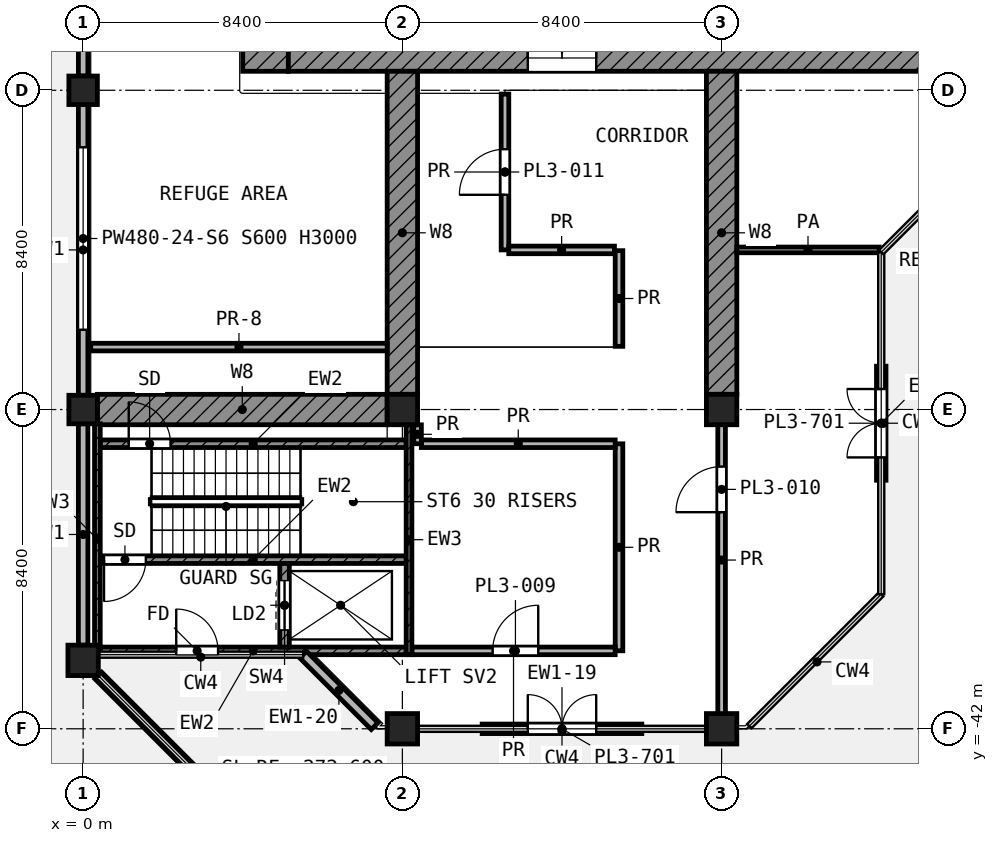
"""IFC4 building model, lengths in metres.
Left out: names, types, materials, properties, quantities, classifications, styles, units other than length and angle.
Written with IfcOpenShell. Run it as: python <this file> out.ifc"""

import sys

from ifc_helpers import new_model, si_unit, direction, frame, frame_2d, origin, origin_2d, place, context, subcontext, project, spatial, rectangle, extrude, element, fill, save


model = new_model("IFC4")
c1 = context("Model", 3, precision=1e-05, world=origin(), true_north=direction((0.0, 1.0)))
c2 = subcontext(c1, "Body", "Model", "MODEL_VIEW")
j1 = project(units=[si_unit("LENGTHUNIT", "METRE"), si_unit("PLANEANGLEUNIT", "RADIAN")], contexts=[c1])
p1 = place(None, origin())
s1 = spatial("IfcSite", under=j1, at=p1, CompositionType="ELEMENT")
p2 = place(p1, origin())
s2 = spatial("IfcBuilding", under=s1, at=p2, CompositionType="ELEMENT")
p3 = place(p2, frame((0.0, 0.0, 272.6)))
s3 = spatial("IfcBuildingStorey", under=s2, at=p3, CompositionType="ELEMENT", Elevation=272.6)
for number, where, z_axis, x_axis in (
    (1, (0.0, -25.2, 0.0), (0.0, 0.0, 1.0), (1.0, 0.0, 0.0)),
    (2, (0.0, -33.6, 0.0), (0.0, 0.0, 1.0), (1.0, 0.0, 0.0)),
):
    element("IfcColumn", number, at=place(p3, frame(where, z_axis=z_axis, x_axis=x_axis)), inside=s3, PredefinedType="COLUMN", context=c2, shape_type="SweptSolid", body=[
        extrude(rectangle(XDim=0.75, YDim=0.75, at=origin_2d()), origin(), (0.0, 0.0, 1.0), 5.0),
    ])
for number, where, z_axis, x_axis in (
    (3, (8.4, -33.6, 0.0), (0.0, 0.0, 1.0), (1.0, 0.0, 0.0)),
    (4, (16.8, -33.6, 0.0), (0.0, 0.0, 1.0), (1.0, 0.0, 0.0)),
    (5, (0.0, -40.2, 0.0), (0.0, 0.0, 1.0), (1.0, 0.0, 0.0)),
    (6, (8.4, -42.0, 0.0), (0.0, 0.0, 1.0), (1.0, 0.0, 0.0)),
    (7, (16.8, -42.0, 0.0), (0.0, 0.0, 1.0), (1.0, 0.0, 0.0)),
):
    element("IfcColumn", number, at=place(p3, frame(where, z_axis=z_axis, x_axis=x_axis)), inside=s3, PredefinedType="COLUMN", context=c2, shape_type="SweptSolid", body=[
        extrude(rectangle(XDim=0.8, YDim=0.8, at=origin_2d()), origin(), (0.0, 0.0, 1.0), 5.0),
    ])
for number, where, z_axis, x_axis in (
    (8, (8.4, -24.7, 0.0), (0.0, 0.0, 1.0), (0.0, -1.0, 0.0)),
    (9, (16.8, -24.7, 0.0), (0.0, 0.0, 1.0), (0.0, -1.0, 0.0)),
):
    element("IfcWall", number, at=place(p3, frame(where, z_axis=z_axis, x_axis=x_axis)), inside=s3, PredefinedType="SHEAR", context=c2, shape_type="SweptSolid", body=[
        extrude(rectangle(XDim=8.5, YDim=0.8, at=frame_2d((4.25, 0.0))), origin(), (0.0, 0.0, 1.0), 4.4),
    ])
p4 = place(p3, frame((0.375, -33.6, 0.0), z_axis=(0.0, 0.0, 1.0), x_axis=(1.0, 0.0, 0.0)))
e10 = element("IfcWall", 10, at=p4, inside=s3, PredefinedType="SHEAR", context=c2, shape_type="SweptSolid", body=[
    extrude(rectangle(XDim=7.625, YDim=0.8, at=frame_2d((3.812, 0.0))), origin(), (0.0, 0.0, 1.0), 4.4),
])
p5 = place(p3, frame((0.0, -17.175, 0.0), z_axis=(0.0, 0.0, 1.0), x_axis=(0.0, -1.0, 0.0)))
e11 = element("IfcWall", 11, at=p5, inside=s3, PredefinedType="SOLIDWALL", context=c2, shape_type="SweptSolid", body=[
    extrude(rectangle(XDim=7.65, YDim=0.25, at=frame_2d((3.825, 0.0))), origin(), (0.0, 0.0, 1.0), 3.3),
])
p6 = place(p3, frame((0.0, -25.575, 0.0), z_axis=(0.0, 0.0, 1.0), x_axis=(0.0, -1.0, 0.0)))
e12 = element("IfcWall", 12, at=p6, inside=s3, PredefinedType="SOLIDWALL", context=c2, shape_type="SweptSolid", body=[
    extrude(rectangle(XDim=7.65, YDim=0.25, at=frame_2d((3.825, 0.0))), origin(), (0.0, 0.0, 1.0), 3.3),
])
p7 = place(p6, frame((1.125, 0.0, 0.6)))
e13 = element("IfcOpeningElement", 13, at=p7, cuts=e12, PredefinedType="OPENING", context=c2, shape_type="SweptSolid", body=[
    extrude(rectangle(XDim=4.8, YDim=2.4, at=frame_2d((2.4, 1.2))), frame((0.0, 0.135, 0.0), z_axis=(0.0, -1.0, 0.0), x_axis=(1.0, 0.0, 0.0)), (0.0, 0.0, 1.0), 0.27),
])
p8 = place(p3, frame((0.0, -33.975, 0.0), z_axis=(0.0, 0.0, 1.0), x_axis=(0.0, -1.0, 0.0)))
e14 = element("IfcWall", 14, at=p8, inside=s3, PredefinedType="SOLIDWALL", context=c2, shape_type="SweptSolid", body=[
    extrude(rectangle(XDim=5.825, YDim=0.25, at=frame_2d((2.913, 0.0))), origin(), (0.0, 0.0, 1.0), 3.3),
])
p9 = place(p3, frame((0.4, -40.6, 0.0), z_axis=(0.0, 0.0, 1.0), x_axis=(0.707123380132, -0.707090181851, 0.0)))
e15 = element("IfcWall", 15, at=p9, inside=s3, PredefinedType="SOLIDWALL", context=c2, shape_type="SweptSolid", body=[
    extrude(rectangle(XDim=7.354, YDim=0.25, at=frame_2d((3.677, 0.0))), origin(), (0.0, 0.0, 1.0), 3.3),
])
p10 = place(p3, frame((5.79, -40.05, 0.0), z_axis=(0.0, 0.0, 1.0), x_axis=(0.707106781187, -0.707106781187, 0.0)))
e16 = element("IfcWall", 16, at=p10, inside=s3, PredefinedType="SOLIDWALL", context=c2, shape_type="SweptSolid", body=[
    extrude(rectangle(XDim=2.658, YDim=0.25, at=frame_2d((1.329, 0.0))), origin(), (0.0, 0.0, 1.0), 4.4),
])
p11 = place(p3, frame((10.5, -42.001, 0.0), z_axis=(0.0, 0.0, 1.0), x_axis=(1.0, 0.0, 0.0)))
e17 = element("IfcWall", 17, at=p11, inside=s3, PredefinedType="SOLIDWALL", context=c2, shape_type="SweptSolid", body=[
    extrude(rectangle(XDim=4.2, YDim=0.25, at=frame_2d((2.1, 0.0))), origin(), (0.0, 0.0, 1.0), 4.24),
])
p12 = place(p11, frame((1.2, 0.0, 0.0)))
e18 = element("IfcOpeningElement", 18, at=p12, cuts=e17, PredefinedType="OPENING", context=c2, shape_type="SweptSolid", body=[
    extrude(rectangle(XDim=1.8, YDim=2.1, at=frame_2d((0.9, 1.05))), frame((0.0, 0.135, 0.0), z_axis=(0.0, -1.0, 0.0), x_axis=(1.0, 0.0, 0.0)), (0.0, 0.0, 1.0), 0.27),
])
p13 = place(p3, frame((21.0, -35.46, 0.0), z_axis=(0.0, 0.0, 1.0), x_axis=(0.0, 1.0, 0.0)))
e19 = element("IfcWall", 19, at=p13, inside=s3, PredefinedType="SOLIDWALL", context=c2, shape_type="SweptSolid", body=[
    extrude(rectangle(XDim=3.0, YDim=0.25, at=frame_2d((1.5, 0.0))), origin(), (0.0, 0.0, 1.0), 4.24),
])
p14 = place(p13, frame((0.6, 0.0, 0.0)))
e20 = element("IfcOpeningElement", 20, at=p14, cuts=e19, PredefinedType="OPENING", context=c2, shape_type="SweptSolid", body=[
    extrude(rectangle(XDim=1.8, YDim=2.1, at=frame_2d((0.9, 1.05))), frame((0.0, 0.135, 0.0), z_axis=(0.0, -1.0, 0.0), x_axis=(1.0, 0.0, 0.0)), (0.0, 0.0, 1.0), 0.27),
])
p15 = place(p3, frame((4.8, -24.7, 0.0), z_axis=(0.0, 0.0, 1.0), x_axis=(0.0, 1.0, 0.0)))
e21 = element("IfcWall", 21, at=p15, inside=s3, PredefinedType="SHEAR", context=c2, shape_type="SweptSolid", body=[
    extrude(rectangle(XDim=19.3, YDim=1.2, at=frame_2d((9.65, 0.0))), origin(), (0.0, 0.0, 1.0), 4.4),
])
p16 = place(p15, frame((11.15, 0.0, 0.0)))
e22 = element("IfcOpeningElement", 22, at=p16, cuts=e21, PredefinedType="OPENING", context=c2, shape_type="SweptSolid", body=[
    extrude(rectangle(XDim=1.1, YDim=2.1, at=frame_2d((0.55, 1.05))), frame((0.0, 0.61, 0.0), z_axis=(0.0, -1.0, 0.0), x_axis=(1.0, 0.0, 0.0)), (0.0, 0.0, 1.0), 1.22),
])
p17 = place(p15, frame((1.85, 0.0, 0.0)))
e23 = element("IfcOpeningElement", 23, at=p17, cuts=e21, PredefinedType="OPENING", context=c2, shape_type="SweptSolid", body=[
    extrude(rectangle(XDim=1.1, YDim=2.1, at=frame_2d((0.55, 1.05))), frame((0.0, 0.61, 0.0), z_axis=(0.0, -1.0, 0.0), x_axis=(1.0, 0.0, 0.0)), (0.0, 0.0, 1.0), 1.22),
])
p18 = place(p3, frame((5.4, -24.35, 0.0), z_axis=(0.0, 0.0, 1.0), x_axis=(1.0, 0.0, 0.0)))
e24 = element("IfcWall", 24, at=p18, inside=s3, PredefinedType="SHEAR", context=c2, shape_type="SweptSolid", body=[
    extrude(rectangle(XDim=18.6, YDim=0.7, at=frame_2d((9.3, 0.0))), origin(), (0.0, 0.0, 1.0), 4.4),
])
p19 = place(p18, frame((6.3, 0.0, 0.0)))
e25 = element("IfcOpeningElement", 25, at=p19, cuts=e24, PredefinedType="OPENING", context=c2, shape_type="SweptSolid", body=[
    extrude(rectangle(XDim=1.8, YDim=2.1, at=frame_2d((0.9, 1.05))), frame((0.0, 0.36, 0.0), z_axis=(0.0, -1.0, 0.0), x_axis=(1.0, 0.0, 0.0)), (0.0, 0.0, 1.0), 0.72),
])
p20 = place(p3, frame((0.375, -40.05, 0.0), z_axis=(0.0, 0.0, 1.0), x_axis=(0.0, 1.0, 0.0)))
e26 = element("IfcWall", 26, at=p20, inside=s3, PredefinedType="SHEAR", context=c2, shape_type="SweptSolid", body=[
    extrude(rectangle(XDim=6.075, YDim=0.15, at=frame_2d((3.038, 0.0))), origin(), (0.0, 0.0, 1.0), 4.4),
])
p21 = place(p3, frame((8.575, -40.05, 0.0), z_axis=(0.0, 0.0, 1.0), x_axis=(0.0, 1.0, 0.0)))
e27 = element("IfcWall", 27, at=p21, inside=s3, PredefinedType="SHEAR", context=c2, shape_type="SweptSolid", body=[
    extrude(rectangle(XDim=6.05, YDim=0.15, at=frame_2d((3.025, 0.0))), origin(), (0.0, 0.0, 1.0), 4.4),
])
p22 = place(p3, frame((0.45, -34.5, 0.0), z_axis=(0.0, 0.0, 1.0), x_axis=(1.0, 0.0, 0.0)))
e28 = element("IfcWall", 28, at=p22, inside=s3, PredefinedType="SHEAR", context=c2, shape_type="SweptSolid", body=[
    extrude(rectangle(XDim=8.05, YDim=0.2, at=frame_2d((4.025, 0.0))), origin(), (0.0, 0.0, 1.0), 4.4),
])
p23 = place(p22, frame((0.75, 0.0, 0.0)))
e29 = element("IfcOpeningElement", 29, at=p23, cuts=e28, PredefinedType="OPENING", context=c2, shape_type="SweptSolid", body=[
    extrude(rectangle(XDim=1.1, YDim=2.1, at=frame_2d((0.55, 1.05))), frame((0.0, 0.11, 0.0), z_axis=(0.0, -1.0, 0.0), x_axis=(1.0, 0.0, 0.0)), (0.0, 0.0, 1.0), 0.22),
])
p24 = place(p3, frame((0.45, -37.55, 0.0), z_axis=(0.0, 0.0, 1.0), x_axis=(1.0, 0.0, 0.0)))
e30 = element("IfcWall", 30, at=p24, inside=s3, PredefinedType="SHEAR", context=c2, shape_type="SweptSolid", body=[
    extrude(rectangle(XDim=8.05, YDim=0.2, at=frame_2d((4.025, 0.0))), origin(), (0.0, 0.0, 1.0), 4.4),
])
p25 = place(p24, frame((0.1, 0.0, 0.0)))
e31 = element("IfcOpeningElement", 31, at=p25, cuts=e30, PredefinedType="OPENING", context=c2, shape_type="SweptSolid", body=[
    extrude(rectangle(XDim=1.1, YDim=2.1, at=frame_2d((0.55, 1.05))), frame((0.0, 0.11, 0.0), z_axis=(0.0, -1.0, 0.0), x_axis=(1.0, 0.0, 0.0)), (0.0, 0.0, 1.0), 0.22),
])
p26 = place(p3, frame((0.45, -39.95, 0.0), z_axis=(0.0, 0.0, 1.0), x_axis=(1.0, 0.0, 0.0)))
e32 = element("IfcWall", 32, at=p26, inside=s3, PredefinedType="SHEAR", context=c2, shape_type="SweptSolid", body=[
    extrude(rectangle(XDim=8.05, YDim=0.2, at=frame_2d((4.025, 0.0))), origin(), (0.0, 0.0, 1.0), 4.4),
])
p27 = place(p26, frame((2.0, 0.0, 0.0)))
e33 = element("IfcOpeningElement", 33, at=p27, cuts=e32, PredefinedType="OPENING", context=c2, shape_type="SweptSolid", body=[
    extrude(rectangle(XDim=1.1, YDim=2.1, at=frame_2d((0.55, 1.05))), frame((0.0, 0.11, 0.0), z_axis=(0.0, -1.0, 0.0), x_axis=(1.0, 0.0, 0.0)), (0.0, 0.0, 1.0), 0.22),
])
p28 = place(p3, frame((5.3, -39.85, 0.0), z_axis=(0.0, 0.0, 1.0), x_axis=(0.0, 1.0, 0.0)))
e34 = element("IfcWall", 34, at=p28, inside=s3, PredefinedType="SHEAR", context=c2, shape_type="SweptSolid", body=[
    extrude(rectangle(XDim=2.2, YDim=0.25, at=frame_2d((1.1, 0.0))), origin(), (0.0, 0.0, 1.0), 4.4),
])
p29 = place(p28, frame((0.45, 0.0, 0.0)))
e35 = element("IfcOpeningElement", 35, at=p29, cuts=e34, PredefinedType="OPENING", context=c2, shape_type="SweptSolid", body=[
    extrude(rectangle(XDim=1.3, YDim=2.1, at=frame_2d((0.65, 1.05))), frame((0.0, 0.135, 0.0), z_axis=(0.0, -1.0, 0.0), x_axis=(1.0, 0.0, 0.0)), (0.0, 0.0, 1.0), 0.27),
])
p30 = place(p3, frame((17.199, -29.4, 0.0), z_axis=(0.0, 0.0, 1.0), x_axis=(1.0, 0.0, 0.0)))
e36 = element("IfcWall", 36, at=p30, inside=s3, PredefinedType="PARTITIONING", context=c2, shape_type="SweptSolid", body=[
    extrude(rectangle(XDim=3.748, YDim=0.15, at=frame_2d((1.874, 0.0))), origin(), (0.0, 0.0, 1.0), 4.4),
])
p31 = place(p3, frame((8.65, -39.95, 0.0), z_axis=(0.0, 0.0, 1.0), x_axis=(1.0, 0.0, 0.0)))
e37 = element("IfcWall", 37, at=p31, inside=s3, PredefinedType="PARTITIONING", context=c2, shape_type="SweptSolid", body=[
    extrude(rectangle(XDim=5.349, YDim=0.2, at=frame_2d((2.675, 0.0))), origin(), (0.0, 0.0, 1.0), 4.4),
])
p32 = place(p31, frame((2.125, 0.0, 0.0)))
e38 = element("IfcOpeningElement", 38, at=p32, cuts=e37, PredefinedType="OPENING", context=c2, shape_type="SweptSolid", body=[
    extrude(rectangle(XDim=1.2, YDim=2.1, at=frame_2d((0.6, 1.05))), frame((0.0, 0.11, 0.0), z_axis=(0.0, -1.0, 0.0), x_axis=(1.0, 0.0, 0.0)), (0.0, 0.0, 1.0), 0.22),
])
p33 = place(p3, frame((8.9, -34.5, 0.0), z_axis=(0.0, 0.0, 1.0), x_axis=(1.0, 0.0, 0.0)))
e39 = element("IfcWall", 39, at=p33, inside=s3, PredefinedType="PARTITIONING", context=c2, shape_type="SweptSolid", body=[
    extrude(rectangle(XDim=5.099, YDim=0.2, at=frame_2d((2.55, 0.0))), origin(), (0.0, 0.0, 1.0), 4.4),
])
p34 = place(p3, frame((0.2, -31.957, 0.0), z_axis=(0.0, 0.0, 1.0), x_axis=(1.0, 0.0, 0.0)))
e40 = element("IfcWall", 40, at=p34, inside=s3, PredefinedType="PARTITIONING", context=c2, shape_type="SweptSolid", body=[
    extrude(rectangle(XDim=7.801, YDim=0.2, at=frame_2d((3.9, 0.0))), origin(), (0.0, 0.0, 1.0), 3.3),
])
p35 = place(p3, frame((11.2, -29.4, 0.0), z_axis=(0.0, 0.0, 1.0), x_axis=(1.0, 0.0, 0.0)))
e41 = element("IfcWall", 41, at=p35, inside=s3, PredefinedType="PARTITIONING", context=c2, shape_type="SweptSolid", body=[
    extrude(rectangle(XDim=2.78, YDim=0.2, at=frame_2d((1.39, 0.0))), origin(), (0.0, 0.0, 1.0), 4.4),
])
p36 = place(p3, frame((8.8, -34.5, 0.0), z_axis=(0.0, 0.0, 1.0), x_axis=(0.0, 1.0, 0.0)))
e42 = element("IfcWall", 42, at=p36, inside=s3, PredefinedType="PARTITIONING", context=c2, shape_type="SweptSolid", body=[
    extrude(rectangle(XDim=0.497, YDim=0.2, at=frame_2d((0.249, 0.0))), origin(), (0.0, 0.0, 1.0), 4.4),
])
p37 = place(p3, frame((11.1, -29.4, 0.0), z_axis=(0.0, 0.0, 1.0), x_axis=(0.0, 1.0, 0.0)))
e43 = element("IfcWall", 43, at=p37, inside=s3, PredefinedType="PARTITIONING", context=c2, shape_type="SweptSolid", body=[
    extrude(rectangle(XDim=4.1, YDim=0.2, at=frame_2d((2.05, 0.0))), origin(), (0.0, 0.0, 1.0), 4.4),
])
p38 = place(p37, frame((1.45, 0.0, 0.0)))
e44 = element("IfcOpeningElement", 44, at=p38, cuts=e43, PredefinedType="OPENING", context=c2, shape_type="SweptSolid", body=[
    extrude(rectangle(XDim=1.2, YDim=2.1, at=frame_2d((0.6, 1.05))), frame((0.0, 0.11, 0.0), z_axis=(0.0, -1.0, 0.0), x_axis=(1.0, 0.0, 0.0)), (0.0, 0.0, 1.0), 0.22),
])
p39 = place(p3, frame((14.1, -39.948, 0.0), z_axis=(0.0, 0.0, 1.0), x_axis=(0.0, 1.0, 0.0)))
e45 = element("IfcWall", 45, at=p39, inside=s3, PredefinedType="PARTITIONING", context=c2, shape_type="SweptSolid", body=[
    extrude(rectangle(XDim=5.446, YDim=0.2, at=frame_2d((2.723, 0.0))), origin(), (0.0, 0.0, 1.0), 4.4),
])
p40 = place(p3, frame((14.1, -31.937, 0.0), z_axis=(0.0, 0.0, 1.0), x_axis=(0.0, 1.0, 0.0)))
e46 = element("IfcWall", 46, at=p40, inside=s3, PredefinedType="PARTITIONING", context=c2, shape_type="SweptSolid", body=[
    extrude(rectangle(XDim=2.517, YDim=0.2, at=frame_2d((1.259, 0.0))), origin(), (0.0, 0.0, 1.0), 4.4),
])
p41 = place(p3, frame((16.8, -41.921, 0.0), z_axis=(0.0, 0.0, 1.0), x_axis=(0.0, 1.0, 0.0)))
e47 = element("IfcWall", 47, at=p41, inside=s3, PredefinedType="PARTITIONING", context=c2, shape_type="SweptSolid", body=[
    extrude(rectangle(XDim=8.721, YDim=0.2, at=frame_2d((4.36, 0.0))), origin(), (0.0, 0.0, 1.0), 4.4),
])
p42 = place(p41, frame((5.62, 0.0, 0.0)))
e48 = element("IfcOpeningElement", 48, at=p42, cuts=e47, PredefinedType="OPENING", context=c2, shape_type="SweptSolid", body=[
    extrude(rectangle(XDim=1.2, YDim=2.1, at=frame_2d((0.6, 1.05))), frame((0.0, 0.11, 0.0), z_axis=(0.0, -1.0, 0.0), x_axis=(1.0, 0.0, 0.0)), (0.0, 0.0, 1.0), 0.22),
])
p43 = place(p7, origin())
e49 = element("IfcWindow", 49, at=p43, inside=s3, PartitioningType="SINGLE_PANEL", PredefinedType="WINDOW", context=c2, shape_type="SweptSolid", body=[
    extrude(rectangle(XDim=4.8, YDim=2.4, at=frame_2d((2.4, 1.2))), frame((0.0, 0.03, 0.0), z_axis=(0.0, -1.0, 0.0), x_axis=(1.0, 0.0, 0.0)), (0.0, 0.0, 1.0), 0.06),
])
fill(e13, e49)
p44 = place(p12, origin())
e50 = element("IfcDoor", 50, at=p44, inside=s3, OperationType="DOUBLE_DOOR_SINGLE_SWING", PredefinedType="DOOR", context=c2, shape_type="SweptSolid", body=[
    extrude(rectangle(XDim=1.8, YDim=2.1, at=frame_2d((0.9, 1.05))), frame((0.0, 0.025, 0.0), z_axis=(0.0, -1.0, 0.0), x_axis=(1.0, 0.0, 0.0)), (0.0, 0.0, 1.0), 0.05),
])
fill(e18, e50)
p45 = place(p14, origin())
e51 = element("IfcDoor", 51, at=p45, inside=s3, OperationType="DOUBLE_DOOR_SINGLE_SWING", PredefinedType="DOOR", context=c2, shape_type="SweptSolid", body=[
    extrude(rectangle(XDim=1.8, YDim=2.1, at=frame_2d((0.9, 1.05))), frame((0.0, 0.025, 0.0), z_axis=(0.0, -1.0, 0.0), x_axis=(1.0, 0.0, 0.0)), (0.0, 0.0, 1.0), 0.05),
])
fill(e20, e51)
p46 = place(p19, origin())
e52 = element("IfcDoor", 52, at=p46, inside=s3, OperationType="DOUBLE_DOOR_SINGLE_SWING", PredefinedType="DOOR", context=c2, shape_type="SweptSolid", body=[
    extrude(rectangle(XDim=1.8, YDim=2.1, at=frame_2d((0.9, 1.05))), frame((0.0, 0.025, 0.0), z_axis=(0.0, -1.0, 0.0), x_axis=(1.0, 0.0, 0.0)), (0.0, 0.0, 1.0), 0.05),
])
fill(e25, e52)
p47 = place(p23, origin())
e53 = element("IfcDoor", 53, at=p47, inside=s3, OperationType="SINGLE_SWING_LEFT", PredefinedType="DOOR", context=c2, shape_type="SweptSolid", body=[
    extrude(rectangle(XDim=1.1, YDim=2.1, at=frame_2d((0.55, 1.05))), frame((0.0, 0.025, 0.0), z_axis=(0.0, -1.0, 0.0), x_axis=(1.0, 0.0, 0.0)), (0.0, 0.0, 1.0), 0.05),
])
fill(e29, e53)
p48 = place(p25, frame((1.1, 0.0, 0.0), z_axis=(0.0, 0.0, 1.0), x_axis=(-1.0, 0.0, 0.0)))
e54 = element("IfcDoor", 54, at=p48, inside=s3, OperationType="SINGLE_SWING_LEFT", PredefinedType="DOOR", context=c2, shape_type="SweptSolid", body=[
    extrude(rectangle(XDim=1.1, YDim=2.1, at=frame_2d((0.55, 1.05))), frame((0.0, 0.025, 0.0), z_axis=(0.0, -1.0, 0.0), x_axis=(1.0, 0.0, 0.0)), (0.0, 0.0, 1.0), 0.05),
])
fill(e31, e54)
p49 = place(p29, origin())
e55 = element("IfcDoor", 55, at=p49, inside=s3, OperationType="DOUBLE_DOOR_SLIDING", PredefinedType="DOOR", context=c2, shape_type="SweptSolid", body=[
    extrude(rectangle(XDim=1.3, YDim=2.1, at=frame_2d((0.65, 1.05))), frame((0.0, 0.025, 0.0), z_axis=(0.0, -1.0, 0.0), x_axis=(1.0, 0.0, 0.0)), (0.0, 0.0, 1.0), 0.05),
])
fill(e35, e55)
p50 = place(p27, origin())
e56 = element("IfcDoor", 56, at=p50, inside=s3, OperationType="SINGLE_SWING_LEFT", PredefinedType="DOOR", context=c2, shape_type="SweptSolid", body=[
    extrude(rectangle(XDim=1.1, YDim=2.1, at=frame_2d((0.55, 1.05))), frame((0.0, 0.025, 0.0), z_axis=(0.0, -1.0, 0.0), x_axis=(1.0, 0.0, 0.0)), (0.0, 0.0, 1.0), 0.05),
])
fill(e33, e56)
p51 = place(p32, origin())
e57 = element("IfcDoor", 57, at=p51, inside=s3, OperationType="SINGLE_SWING_RIGHT", PredefinedType="DOOR", context=c2, shape_type="SweptSolid", body=[
    extrude(rectangle(XDim=1.2, YDim=2.1, at=frame_2d((0.6, 1.05))), frame((0.0, 0.025, 0.0), z_axis=(0.0, -1.0, 0.0), x_axis=(1.0, 0.0, 0.0)), (0.0, 0.0, 1.0), 0.05),
])
fill(e38, e57)
p52 = place(p42, origin())
e58 = element("IfcDoor", 58, at=p52, inside=s3, OperationType="SINGLE_SWING_LEFT", PredefinedType="DOOR", context=c2, shape_type="SweptSolid", body=[
    extrude(rectangle(XDim=1.2, YDim=2.1, at=frame_2d((0.6, 1.05))), frame((0.0, 0.025, 0.0), z_axis=(0.0, -1.0, 0.0), x_axis=(1.0, 0.0, 0.0)), (0.0, 0.0, 1.0), 0.05),
])
fill(e48, e58)
p53 = place(p38, origin())
e59 = element("IfcDoor", 59, at=p53, inside=s3, OperationType="SINGLE_SWING_LEFT", PredefinedType="DOOR", context=c2, shape_type="SweptSolid", body=[
    extrude(rectangle(XDim=1.2, YDim=2.1, at=frame_2d((0.6, 1.05))), frame((0.0, 0.025, 0.0), z_axis=(0.0, -1.0, 0.0), x_axis=(1.0, 0.0, 0.0)), (0.0, 0.0, 1.0), 0.05),
])
fill(e44, e59)
save(model, sys.argv[1])
